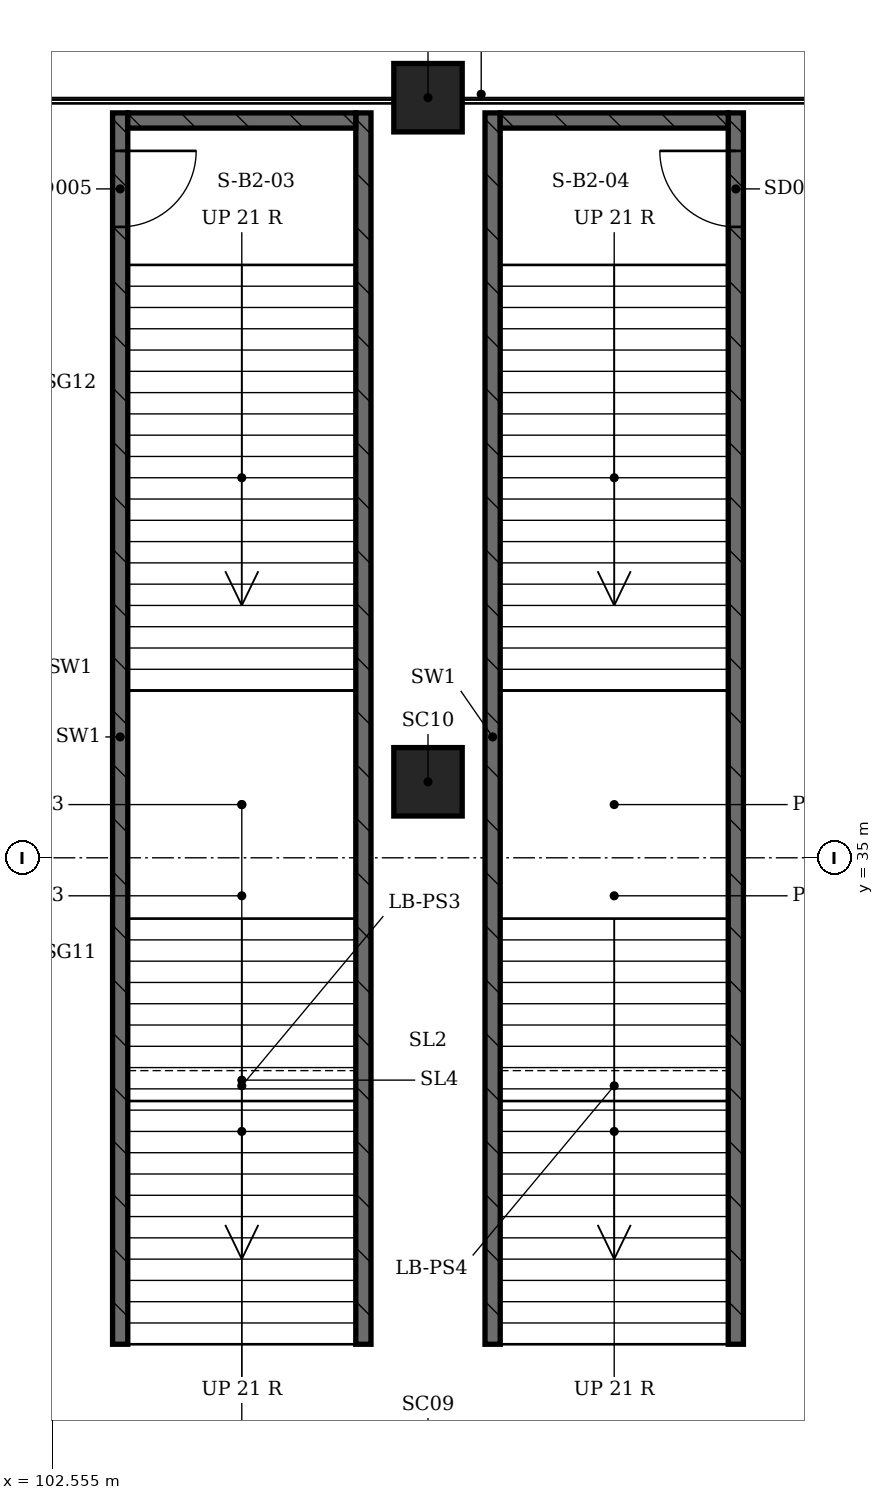
"""IFC4 building model, lengths in metres.
Left out: names, types, materials, properties, quantities, classifications, styles, units other than length and angle.
Written with IfcOpenShell. Run it as: python <this file> out.ifc"""

import sys

from ifc_helpers import new_model, si_unit, direction, frame, frame_2d, origin, origin_2d, place, context, subcontext, project, spatial, rectangle, extrude, element, fill, save


model = new_model("IFC4")
c1 = context("Model", 3, precision=1e-05, world=origin(), true_north=direction((0.0, 1.0)))
c2 = subcontext(c1, "Body", "Model", "MODEL_VIEW")
j1 = project(units=[si_unit("LENGTHUNIT", "METRE"), si_unit("PLANEANGLEUNIT", "RADIAN")], contexts=[c1])
p1 = place(None, origin())
s1 = spatial("IfcSite", under=j1, at=p1, CompositionType="ELEMENT")
p2 = place(p1, origin())
s2 = spatial("IfcBuilding", under=s1, at=p2, CompositionType="ELEMENT")
p3 = place(p2, frame((0.0, 0.0, -11.4)))
s3 = spatial("IfcBuildingStorey", under=s2, at=p3, CompositionType="ELEMENT", Elevation=-11.4)
p4 = place(p3, frame((103.45, 28.6, -1.1), z_axis=(0.0, 0.0, 1.0), x_axis=(0.0, 1.0, 0.0)))
e1 = element("IfcWall", 1, at=p4, inside=s3, PredefinedType="SHEAR", context=c2, shape_type="SweptSolid", body=[
    extrude(rectangle(XDim=16.2, YDim=0.2, at=frame_2d((8.1, 0.0))), origin(), (0.0, 0.0, 1.0), 8.0),
])
p5 = place(p4, frame((14.7, 0.0, 1.1)))
e2 = element("IfcOpeningElement", 2, at=p5, cuts=e1, PredefinedType="OPENING", context=c2, shape_type="SweptSolid", body=[
    extrude(rectangle(XDim=1.0, YDim=2.1, at=frame_2d((0.5, 1.05))), frame((0.0, 0.1, 0.0), z_axis=(0.0, -1.0, 0.0), x_axis=(1.0, 0.0, 0.0)), (0.0, 0.0, 1.0), 0.2),
])
p6 = place(p3, frame((106.65, 28.6, -1.1), z_axis=(0.0, 0.0, 1.0), x_axis=(0.0, 1.0, 0.0)))
e3 = element("IfcWall", 3, at=p6, inside=s3, PredefinedType="SHEAR", context=c2, shape_type="SweptSolid", body=[
    extrude(rectangle(XDim=16.2, YDim=0.2, at=frame_2d((8.1, 0.0))), origin(), (0.0, 0.0, 1.0), 8.0),
])
p7 = place(p3, frame((103.55, 44.7, -1.1), z_axis=(0.0, 0.0, 1.0), x_axis=(1.0, 0.0, 0.0)))
e4 = element("IfcWall", 4, at=p7, inside=s3, PredefinedType="SHEAR", context=c2, shape_type="SweptSolid", body=[
    extrude(rectangle(XDim=3.0, YDim=0.2, at=frame_2d((1.5, 0.0))), origin(), (0.0, 0.0, 1.0), 8.0),
])
p8 = place(p3, frame((108.35, 28.6, -1.1), z_axis=(0.0, 0.0, 1.0), x_axis=(0.0, 1.0, 0.0)))
e5 = element("IfcWall", 5, at=p8, inside=s3, PredefinedType="SHEAR", context=c2, shape_type="SweptSolid", body=[
    extrude(rectangle(XDim=16.2, YDim=0.2, at=frame_2d((8.1, 0.0))), origin(), (0.0, 0.0, 1.0), 8.0),
])
p9 = place(p3, frame((111.55, 28.6, -1.1), z_axis=(0.0, 0.0, 1.0), x_axis=(0.0, 1.0, 0.0)))
e6 = element("IfcWall", 6, at=p9, inside=s3, PredefinedType="SHEAR", context=c2, shape_type="SweptSolid", body=[
    extrude(rectangle(XDim=16.2, YDim=0.2, at=frame_2d((8.1, 0.0))), origin(), (0.0, 0.0, 1.0), 8.0),
])
p10 = place(p9, frame((14.7, 0.0, 1.1)))
e7 = element("IfcOpeningElement", 7, at=p10, cuts=e6, PredefinedType="OPENING", context=c2, shape_type="SweptSolid", body=[
    extrude(rectangle(XDim=1.0, YDim=2.1, at=frame_2d((0.5, 1.05))), frame((0.0, 0.1, 0.0), z_axis=(0.0, -1.0, 0.0), x_axis=(1.0, 0.0, 0.0)), (0.0, 0.0, 1.0), 0.2),
])
p11 = place(p3, frame((108.45, 44.7, -1.1), z_axis=(0.0, 0.0, 1.0), x_axis=(1.0, 0.0, 0.0)))
e8 = element("IfcWall", 8, at=p11, inside=s3, PredefinedType="SHEAR", context=c2, shape_type="SweptSolid", body=[
    extrude(rectangle(XDim=3.0, YDim=0.2, at=frame_2d((1.5, 0.0))), origin(), (0.0, 0.0, 1.0), 8.0),
])
for number, where, z_axis, x_axis in (
    (9, (107.5, 36.0, -1.1), (0.0, 0.0, 1.0), (1.0, 0.0, 0.0)),
    (10, (107.5, 45.0, -1.1), (0.0, 0.0, 1.0), (1.0, 0.0, 0.0)),
):
    element("IfcColumn", number, at=place(p3, frame(where, z_axis=z_axis, x_axis=x_axis)), inside=s3, PredefinedType="COLUMN", context=c2, shape_type="SweptSolid", body=[
        extrude(rectangle(XDim=0.9, YDim=0.9, at=origin_2d()), origin(), (0.0, 0.0, 1.0), 7.5),
    ])
p12 = place(p5, origin())
e11 = element("IfcDoor", 11, at=p12, inside=s3, OperationType="SINGLE_SWING_RIGHT", PredefinedType="DOOR", context=c2, shape_type="SweptSolid", body=[
    extrude(rectangle(XDim=1.0, YDim=2.1, at=frame_2d((0.5, 1.05))), frame((0.0, 0.025, 0.0), z_axis=(0.0, -1.0, 0.0), x_axis=(1.0, 0.0, 0.0)), (0.0, 0.0, 1.0), 0.05),
])
fill(e2, e11)
p13 = place(p10, origin())
e12 = element("IfcDoor", 12, at=p13, inside=s3, OperationType="SINGLE_SWING_LEFT", PredefinedType="DOOR", context=c2, shape_type="SweptSolid", body=[
    extrude(rectangle(XDim=1.0, YDim=2.1, at=frame_2d((0.5, 1.05))), frame((0.0, 0.025, 0.0), z_axis=(0.0, -1.0, 0.0), x_axis=(1.0, 0.0, 0.0)), (0.0, 0.0, 1.0), 0.05),
])
fill(e7, e12)
save(model, sys.argv[1])
